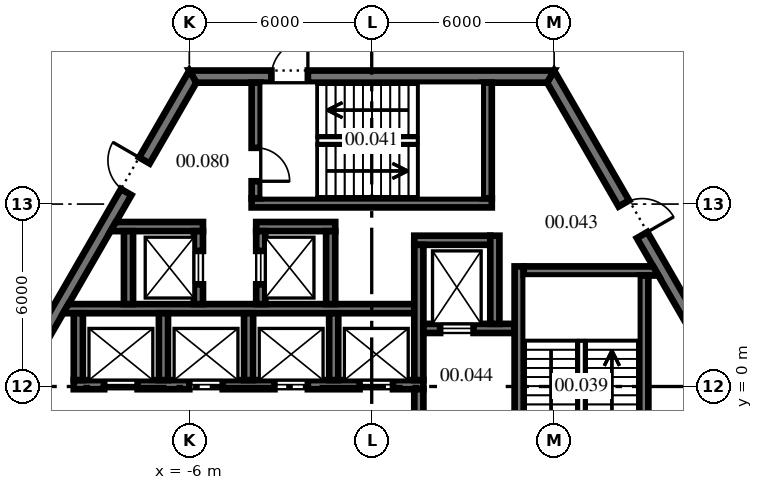
"""IFC4 building model, lengths in metres.
Left out: names, types, materials, properties, quantities, classifications, styles, units other than length and angle.
Written with IfcOpenShell. Run it as: python <this file> out.ifc"""

import sys

from ifc_helpers import new_model, si_unit, direction, frame, frame_2d, origin, place, context, subcontext, project, spatial, polyline, rectangle, outline, extrude, source, transform, mapped, element, fill, save


model = new_model("IFC4")
c1 = context("Model", 3, precision=1e-05, world=origin(), true_north=direction((0.0, 1.0)))
c2 = subcontext(c1, "Body", "Model", "MODEL_VIEW")
j1 = project(units=[si_unit("LENGTHUNIT", "METRE"), si_unit("PLANEANGLEUNIT", "RADIAN")], contexts=[c1])
p1 = place(None, origin())
s1 = spatial("IfcSite", under=j1, at=p1, CompositionType="ELEMENT")
p2 = place(p1, origin())
s2 = spatial("IfcBuilding", under=s1, at=p2, CompositionType="ELEMENT")
p3 = place(p2, origin())
s3 = spatial("IfcBuildingStorey", under=s2, at=p3, CompositionType="ELEMENT", Elevation=0.0)
m1 = source(origin(), c2, "Body", "SweptSolid", [
    extrude(outline(polyline([(-0.115, -0.2), (11.885, -0.2), (11.654, 0.2), (0.115, 0.2), (-0.115, -0.2)])), origin(), (0.0, 0.0, 1.0), 7.0),
])
p4 = place(p3, frame((11.769, 0.0, -0.2), z_axis=(0.0, 0.0, 1.0), x_axis=(-0.499996592174, 0.866027371285, 0.0)))
e1 = element("IfcWall", 1, at=p4, inside=s3, PredefinedType="SHEAR", context=c2, shape_type="MappedRepresentation", body=[
    mapped(m1, transform((0.0, 0.0, 0.0), scale=1.0)),
])
p5 = place(p4, frame((5.75, 0.0, 0.2)))
e2 = element("IfcOpeningElement", 2, at=p5, cuts=e1, PredefinedType="OPENING", context=c2, shape_type="SweptSolid", body=[
    extrude(rectangle(XDim=1.2, YDim=2.1, at=frame_2d((0.6, 1.05))), frame((0.0, 0.21, 0.0), z_axis=(0.0, -1.0, 0.0), x_axis=(1.0, 0.0, 0.0)), (0.0, 0.0, 1.0), 0.42),
])
p6 = place(p3, frame((5.885, 10.192, -0.2), z_axis=(0.0, 0.0, 1.0), x_axis=(-1.0, 0.0, 0.0)))
e3 = element("IfcWall", 3, at=p6, inside=s3, PredefinedType="SHEAR", context=c2, shape_type="MappedRepresentation", body=[
    mapped(m1, transform((0.0, 0.0, 0.0), scale=1.0)),
])
p7 = place(p6, frame((7.985, 0.0, 0.2)))
e4 = element("IfcOpeningElement", 4, at=p7, cuts=e3, PredefinedType="OPENING", context=c2, shape_type="SweptSolid", body=[
    extrude(rectangle(XDim=1.2, YDim=2.1, at=frame_2d((0.6, 1.05))), frame((0.0, 0.21, 0.0), z_axis=(0.0, -1.0, 0.0), x_axis=(1.0, 0.0, 0.0)), (0.0, 0.0, 1.0), 0.42),
])
p8 = place(p3, frame((-5.885, 10.192, -0.2), z_axis=(0.0, 0.0, 1.0), x_axis=(-0.499996592174, -0.866027371285, 0.0)))
e5 = element("IfcWall", 5, at=p8, inside=s3, PredefinedType="SHEAR", context=c2, shape_type="MappedRepresentation", body=[
    mapped(m1, transform((0.0, 0.0, 0.0), scale=1.0)),
])
p9 = place(p8, frame((3.185, 0.0, 0.2)))
e6 = element("IfcOpeningElement", 6, at=p9, cuts=e5, PredefinedType="OPENING", context=c2, shape_type="SweptSolid", body=[
    extrude(rectangle(XDim=1.2, YDim=2.1, at=frame_2d((0.6, 1.05))), frame((0.0, 0.21, 0.0), z_axis=(0.0, -1.0, 0.0), x_axis=(1.0, 0.0, 0.0)), (0.0, 0.0, 1.0), 0.42),
])
p10 = place(p3, frame((-11.769, 0.0, -0.2), z_axis=(0.0, 0.0, 1.0), x_axis=(0.499996592174, -0.866027371285, 0.0)))
e7 = element("IfcWall", 7, at=p10, inside=s3, PredefinedType="SHEAR", context=c2, shape_type="MappedRepresentation", body=[
    mapped(m1, transform((0.0, 0.0, 0.0), scale=1.0)),
])
p11 = place(p10, frame((1.405, 0.0, 0.2)))
e8 = element("IfcOpeningElement", 8, at=p11, cuts=e7, PredefinedType="OPENING", context=c2, shape_type="SweptSolid", body=[
    extrude(rectangle(XDim=1.8, YDim=2.1, at=frame_2d((0.9, 1.05))), frame((0.0, 0.21, 0.0), z_axis=(0.0, -1.0, 0.0), x_axis=(1.0, 0.0, 0.0)), (0.0, 0.0, 1.0), 0.42),
])
p12 = place(p10, frame((7.915, 0.0, 0.2)))
e9 = element("IfcOpeningElement", 9, at=p12, cuts=e7, PredefinedType="OPENING", context=c2, shape_type="SweptSolid", body=[
    extrude(rectangle(XDim=1.2, YDim=2.1, at=frame_2d((0.6, 1.05))), frame((0.0, 0.21, 0.0), z_axis=(0.0, -1.0, 0.0), x_axis=(1.0, 0.0, 0.0)), (0.0, 0.0, 1.0), 0.42),
])
p13 = place(p3, frame((5.885, -10.192, -0.2), z_axis=(0.0, 0.0, 1.0), x_axis=(0.499996592174, 0.866027371285, 0.0)))
e10 = element("IfcWall", 10, at=p13, inside=s3, PredefinedType="SHEAR", context=c2, shape_type="MappedRepresentation", body=[
    mapped(m1, transform((0.0, 0.0, 0.0), scale=1.0)),
])
p14 = place(p13, frame((3.665, 0.0, 0.2)))
e11 = element("IfcOpeningElement", 11, at=p14, cuts=e10, PredefinedType="OPENING", context=c2, shape_type="SweptSolid", body=[
    extrude(rectangle(XDim=1.2, YDim=2.1, at=frame_2d((0.6, 1.05))), frame((0.0, 0.21, 0.0), z_axis=(0.0, -1.0, 0.0), x_axis=(1.0, 0.0, 0.0)), (0.0, 0.0, 1.0), 0.42),
])
p15 = place(p3, frame((-9.8, 0.06, -0.2), z_axis=(0.0, 0.0, 1.0), x_axis=(1.0, 0.0, 0.0)))
e12 = element("IfcWall", 12, at=p15, inside=s3, PredefinedType="SHEAR", context=c2, shape_type="SweptSolid", body=[
    extrude(rectangle(XDim=11.5, YDim=0.3, at=frame_2d((5.75, 0.0))), origin(), (0.0, 0.0, 1.0), 7.0),
])
p16 = place(p15, frame((1.0, 0.0, 0.2)))
e13 = element("IfcOpeningElement", 13, at=p16, cuts=e12, PredefinedType="OPENING", context=c2, shape_type="SweptSolid", body=[
    extrude(rectangle(XDim=1.1, YDim=2.1, at=frame_2d((0.55, 1.05))), frame((0.0, 0.16, 0.0), z_axis=(0.0, -1.0, 0.0), x_axis=(1.0, 0.0, 0.0)), (0.0, 0.0, 1.0), 0.32),
])
p17 = place(p15, frame((3.8, 0.0, 0.2)))
e14 = element("IfcOpeningElement", 14, at=p17, cuts=e12, PredefinedType="OPENING", context=c2, shape_type="SweptSolid", body=[
    extrude(rectangle(XDim=1.1, YDim=2.1, at=frame_2d((0.55, 1.05))), frame((0.0, 0.16, 0.0), z_axis=(0.0, -1.0, 0.0), x_axis=(1.0, 0.0, 0.0)), (0.0, 0.0, 1.0), 0.32),
])
p18 = place(p15, frame((6.6, 0.0, 0.2)))
e15 = element("IfcOpeningElement", 15, at=p18, cuts=e12, PredefinedType="OPENING", context=c2, shape_type="SweptSolid", body=[
    extrude(rectangle(XDim=1.1, YDim=2.1, at=frame_2d((0.55, 1.05))), frame((0.0, 0.16, 0.0), z_axis=(0.0, -1.0, 0.0), x_axis=(1.0, 0.0, 0.0)), (0.0, 0.0, 1.0), 0.32),
])
p19 = place(p15, frame((9.4, 0.0, 0.2)))
e16 = element("IfcOpeningElement", 16, at=p19, cuts=e12, PredefinedType="OPENING", context=c2, shape_type="SweptSolid", body=[
    extrude(rectangle(XDim=1.1, YDim=2.1, at=frame_2d((0.55, 1.05))), frame((0.0, 0.16, 0.0), z_axis=(0.0, -1.0, 0.0), x_axis=(1.0, 0.0, 0.0)), (0.0, 0.0, 1.0), 0.32),
])
p20 = place(p3, frame((-9.8, 2.56, -0.2), z_axis=(0.0, 0.0, 1.0), x_axis=(1.0, 0.0, 0.0)))
e17 = element("IfcWall", 17, at=p20, inside=s3, PredefinedType="SHEAR", context=c2, shape_type="SweptSolid", body=[
    extrude(outline(polyline([(11.2, -0.15), (-0.349, -0.15), (-0.176, 0.15), (11.2, 0.15), (11.2, -0.15)])), origin(), (0.0, 0.0, 1.0), 7.0),
])
m2 = source(origin(), c2, "Body", "SweptSolid", [
    extrude(rectangle(XDim=2.5, YDim=0.3, at=frame_2d((1.25, 0.0))), origin(), (0.0, 0.0, 1.0), 7.0),
])
p21 = place(p3, frame((1.4, 4.81, -0.2), z_axis=(0.0, 0.0, 1.0), x_axis=(1.0, 0.0, 0.0)))
e18 = element("IfcWall", 18, at=p21, inside=s3, PredefinedType="SHEAR", context=c2, shape_type="MappedRepresentation", body=[
    mapped(m2, transform((0.0, 0.0, 0.0), scale=1.0)),
])
p22 = place(p3, frame((1.55, 0.21, -0.2), z_axis=(0.0, 0.0, 1.0), x_axis=(0.0, 1.0, 0.0)))
e19 = element("IfcWall", 19, at=p22, inside=s3, PredefinedType="SHEAR", context=c2, shape_type="SweptSolid", body=[
    extrude(rectangle(XDim=4.45, YDim=0.3, at=frame_2d((2.225, 0.0))), origin(), (0.0, 0.0, 1.0), 7.0),
])
m3 = source(origin(), c2, "Body", "SweptSolid", [
    extrude(rectangle(XDim=3.0, YDim=0.3, at=frame_2d((1.5, 0.0))), origin(), (0.0, 0.0, 1.0), 7.0),
])
p23 = place(p3, frame((1.7, 1.91, -0.2), z_axis=(0.0, 0.0, 1.0), x_axis=(1.0, 0.0, 0.0)))
e20 = element("IfcWall", 20, at=p23, inside=s3, PredefinedType="SHEAR", context=c2, shape_type="MappedRepresentation", body=[
    mapped(m3, transform((0.0, 0.0, 0.0), scale=1.0)),
])
p24 = place(p23, frame((0.55, 0.0, 0.2)))
e21 = element("IfcOpeningElement", 21, at=p24, cuts=e20, PredefinedType="OPENING", context=c2, shape_type="SweptSolid", body=[
    extrude(rectangle(XDim=1.1, YDim=2.1, at=frame_2d((0.55, 1.05))), frame((0.0, 0.16, 0.0), z_axis=(0.0, -1.0, 0.0), x_axis=(1.0, 0.0, 0.0)), (0.0, 0.0, 1.0), 0.32),
])
p25 = place(p3, frame((4.05, 2.06, -0.2), z_axis=(0.0, 0.0, 1.0), x_axis=(0.0, 1.0, 0.0)))
e22 = element("IfcWall", 22, at=p25, inside=s3, PredefinedType="SHEAR", context=c2, shape_type="SweptSolid", body=[
    extrude(rectangle(XDim=2.9, YDim=0.3, at=frame_2d((1.45, 0.0))), origin(), (0.0, 0.0, 1.0), 7.0),
])
m4 = source(origin(), c2, "Body", "SweptSolid", [
    extrude(rectangle(XDim=2.2, YDim=0.3, at=frame_2d((1.1, 0.0))), origin(), (0.0, 0.0, 1.0), 7.0),
])
p26 = place(p3, frame((-9.65, 0.21, -0.2), z_axis=(0.0, 0.0, 1.0), x_axis=(0.0, 1.0, 0.0)))
e23 = element("IfcWall", 23, at=p26, inside=s3, PredefinedType="SHEAR", context=c2, shape_type="MappedRepresentation", body=[
    mapped(m4, transform((0.0, 0.0, 0.0), scale=1.0)),
])
p27 = place(p3, frame((1.55, -3.09, -0.2), z_axis=(0.0, 0.0, 1.0), x_axis=(0.0, 1.0, 0.0)))
e24 = element("IfcWall", 24, at=p27, inside=s3, PredefinedType="SHEAR", context=c2, shape_type="MappedRepresentation", body=[
    mapped(m3, transform((0.0, 0.0, 0.0), scale=1.0)),
])
p28 = place(p27, frame((0.9, 0.0, 0.2)))
e25 = element("IfcOpeningElement", 25, at=p28, cuts=e24, PredefinedType="OPENING", context=c2, shape_type="SweptSolid", body=[
    extrude(rectangle(XDim=1.2, YDim=2.1, at=frame_2d((0.6, 1.05))), frame((0.0, 0.16, 0.0), z_axis=(0.0, -1.0, 0.0), x_axis=(1.0, 0.0, 0.0)), (0.0, 0.0, 1.0), 0.32),
])
p29 = place(p3, frame((4.85, -6.04, -0.2), z_axis=(0.0, 0.0, 1.0), x_axis=(0.0, 1.0, 0.0)))
e26 = element("IfcWall", 26, at=p29, inside=s3, PredefinedType="SHEAR", context=c2, shape_type="SweptSolid", body=[
    extrude(outline(polyline([(-0.15, -0.15), (9.99, -0.15), (9.99, 0.15), (0.15, 0.15), (-0.15, -0.15)])), origin(), (0.0, 0.0, 1.0), 7.0),
])
p30 = place(p29, frame((3.19, 0.0, 0.2)))
e27 = element("IfcOpeningElement", 27, at=p30, cuts=e26, PredefinedType="OPENING", context=c2, shape_type="SweptSolid", body=[
    extrude(rectangle(XDim=1.1, YDim=2.1, at=frame_2d((0.55, 1.05))), frame((0.0, 0.16, 0.0), z_axis=(0.0, -1.0, 0.0), x_axis=(1.0, 0.0, 0.0)), (0.0, 0.0, 1.0), 0.32),
])
p31 = place(p3, frame((5.0, 3.8, -0.2), z_axis=(0.0, 0.0, 1.0), x_axis=(1.0, 0.0, 0.0)))
e28 = element("IfcWall", 28, at=p31, inside=s3, PredefinedType="SHEAR", context=c2, shape_type="SweptSolid", body=[
    extrude(outline(polyline([(0.0, -0.15), (0.0, 0.15), (4.26, 0.15), (4.433, -0.15), (0.0, -0.15)])), origin(), (0.0, 0.0, 1.0), 7.0),
])
p32 = place(p3, frame((8.95, -3.65, -0.2), z_axis=(0.0, 0.0, 1.0), x_axis=(0.0, 1.0, 0.0)))
e29 = element("IfcWall", 29, at=p32, inside=s3, PredefinedType="SHEAR", context=c2, shape_type="SweptSolid", body=[
    extrude(rectangle(XDim=7.3, YDim=0.3, at=frame_2d((3.65, 0.0))), origin(), (0.0, 0.0, 1.0), 7.0),
])
p33 = place(p3, frame((-3.95, 6.04, -0.2), z_axis=(0.0, 0.0, 1.0), x_axis=(1.0, 0.0, 0.0)))
e30 = element("IfcWall", 30, at=p33, inside=s3, PredefinedType="SHEAR", context=c2, shape_type="SweptSolid", body=[
    extrude(rectangle(XDim=7.9, YDim=0.3, at=frame_2d((3.95, 0.0))), origin(), (0.0, 0.0, 1.0), 7.0),
])
m5 = source(origin(), c2, "Body", "SweptSolid", [
    extrude(outline(polyline([(0.0, -0.15), (0.0, 0.15), (3.804, 0.15), (3.804, -0.15), (0.0, -0.15)])), origin(), (0.0, 0.0, 1.0), 7.0),
])
p34 = place(p3, frame((-3.8, 6.19, -0.2), z_axis=(0.0, 0.0, 1.0), x_axis=(0.0, 1.0, 0.0)))
e31 = element("IfcWall", 31, at=p34, inside=s3, PredefinedType="SHEAR", context=c2, shape_type="MappedRepresentation", body=[
    mapped(m5, transform((0.0, 0.0, 0.0), scale=1.0)),
])
p35 = place(p34, frame((0.56, 0.0, 0.2)))
e32 = element("IfcOpeningElement", 32, at=p35, cuts=e31, PredefinedType="OPENING", context=c2, shape_type="SweptSolid", body=[
    extrude(rectangle(XDim=1.1, YDim=2.1, at=frame_2d((0.55, 1.05))), frame((0.0, 0.16, 0.0), z_axis=(0.0, -1.0, 0.0), x_axis=(1.0, 0.0, 0.0)), (0.0, 0.0, 1.0), 0.32),
])
p36 = place(p3, frame((3.8, 6.19, -0.2), z_axis=(0.0, 0.0, 1.0), x_axis=(0.0, 1.0, 0.0)))
e33 = element("IfcWall", 33, at=p36, inside=s3, PredefinedType="SHEAR", context=c2, shape_type="MappedRepresentation", body=[
    mapped(m5, transform((0.0, 0.0, 0.0), scale=1.0)),
])
p37 = place(p3, frame((-8.15, 5.26, -0.2), z_axis=(0.0, 0.0, 1.0), x_axis=(1.0, 0.0, 0.0)))
e34 = element("IfcWall", 34, at=p37, inside=s3, PredefinedType="SHEAR", context=c2, shape_type="SweptSolid", body=[
    extrude(outline(polyline([(2.6, -0.15), (-0.44, -0.15), (-0.267, 0.15), (2.6, 0.15), (2.6, -0.15)])), origin(), (0.0, 0.0, 1.0), 7.0),
])
m6 = source(origin(), c2, "Body", "SweptSolid", [
    extrude(rectangle(XDim=2.4, YDim=0.3, at=frame_2d((1.2, 0.0))), origin(), (0.0, 0.0, 1.0), 7.0),
])
p38 = place(p3, frame((-8.0, 2.71, -0.2), z_axis=(0.0, 0.0, 1.0), x_axis=(0.0, 1.0, 0.0)))
e35 = element("IfcWall", 35, at=p38, inside=s3, PredefinedType="SHEAR", context=c2, shape_type="MappedRepresentation", body=[
    mapped(m6, transform((0.0, 0.0, 0.0), scale=1.0)),
])
p39 = place(p3, frame((-5.7, 2.71, -0.2), z_axis=(0.0, 0.0, 1.0), x_axis=(0.0, 1.0, 0.0)))
e36 = element("IfcWall", 36, at=p39, inside=s3, PredefinedType="SHEAR", context=c2, shape_type="MappedRepresentation", body=[
    mapped(m6, transform((0.0, 0.0, 0.0), scale=1.0)),
])
p40 = place(p39, frame((0.65, 0.0, 0.2)))
e37 = element("IfcOpeningElement", 37, at=p40, cuts=e36, PredefinedType="OPENING", context=c2, shape_type="SweptSolid", body=[
    extrude(rectangle(XDim=1.1, YDim=2.1, at=frame_2d((0.55, 1.05))), frame((0.0, 0.16, 0.0), z_axis=(0.0, -1.0, 0.0), x_axis=(1.0, 0.0, 0.0)), (0.0, 0.0, 1.0), 0.32),
])
p41 = place(p3, frame((-3.8, 5.26, -0.2), z_axis=(0.0, 0.0, 1.0), x_axis=(1.0, 0.0, 0.0)))
e38 = element("IfcWall", 38, at=p41, inside=s3, PredefinedType="SHEAR", context=c2, shape_type="SweptSolid", body=[
    extrude(rectangle(XDim=2.6, YDim=0.3, at=frame_2d((1.3, 0.0))), origin(), (0.0, 0.0, 1.0), 7.0),
])
p42 = place(p3, frame((-3.65, 2.71, -0.2), z_axis=(0.0, 0.0, 1.0), x_axis=(0.0, 1.0, 0.0)))
e39 = element("IfcWall", 39, at=p42, inside=s3, PredefinedType="SHEAR", context=c2, shape_type="MappedRepresentation", body=[
    mapped(m6, transform((0.0, 0.0, 0.0), scale=1.0)),
])
p43 = place(p42, frame((0.65, 0.0, 0.2)))
e40 = element("IfcOpeningElement", 40, at=p43, cuts=e39, PredefinedType="OPENING", context=c2, shape_type="SweptSolid", body=[
    extrude(rectangle(XDim=1.1, YDim=2.1, at=frame_2d((0.55, 1.05))), frame((0.0, 0.16, 0.0), z_axis=(0.0, -1.0, 0.0), x_axis=(1.0, 0.0, 0.0)), (0.0, 0.0, 1.0), 0.32),
])
p44 = place(p3, frame((-1.35, 2.71, -0.2), z_axis=(0.0, 0.0, 1.0), x_axis=(0.0, 1.0, 0.0)))
e41 = element("IfcWall", 41, at=p44, inside=s3, PredefinedType="SHEAR", context=c2, shape_type="MappedRepresentation", body=[
    mapped(m6, transform((0.0, 0.0, 0.0), scale=1.0)),
])
for number, where, z_axis, x_axis in (
    (42, (-6.85, 0.21, -0.2), (0.0, 0.0, 1.0), (0.0, 1.0, 0.0)),
    (43, (-4.05, 0.21, -0.2), (0.0, 0.0, 1.0), (0.0, 1.0, 0.0)),
    (44, (-1.25, 0.21, -0.2), (0.0, 0.0, 1.0), (0.0, 1.0, 0.0)),
):
    element("IfcWall", number, at=place(p3, frame(where, z_axis=z_axis, x_axis=x_axis)), inside=s3, PredefinedType="SHEAR", context=c2, shape_type="MappedRepresentation", body=[
        mapped(m4, transform((0.0, 0.0, 0.0), scale=1.0)),
    ])
p45 = place(p3, frame((-20.66, 0.0, 0.0), z_axis=(0.0, 0.0, 1.0), x_axis=(0.500006476997, 0.866021664256, 0.0)))
e45 = element("IfcWall", 45, at=p45, inside=s3, PredefinedType="PARTITIONING", context=c2, shape_type="SweptSolid", body=[
    extrude(rectangle(XDim=20.66, YDim=0.15, at=frame_2d((10.33, 0.0))), origin(), (0.0, 0.0, 1.0), 6.8),
])
p46 = place(p45, frame((15.51, 0.0, 0.0)))
e46 = element("IfcOpeningElement", 46, at=p46, cuts=e45, PredefinedType="OPENING", context=c2, shape_type="SweptSolid", body=[
    extrude(rectangle(XDim=0.9, YDim=2.1, at=frame_2d((0.45, 1.05))), frame((0.0, 0.085, 0.0), z_axis=(0.0, -1.0, 0.0), x_axis=(1.0, 0.0, 0.0)), (0.0, 0.0, 1.0), 0.17),
])
p47 = place(p45, frame((6.076, 0.0, 0.0)))
e47 = element("IfcOpeningElement", 47, at=p47, cuts=e45, PredefinedType="OPENING", context=c2, shape_type="SweptSolid", body=[
    extrude(rectangle(XDim=0.9, YDim=2.1, at=frame_2d((0.45, 1.05))), frame((0.0, 0.085, 0.0), z_axis=(0.0, -1.0, 0.0), x_axis=(1.0, 0.0, 0.0)), (0.0, 0.0, 1.0), 0.17),
])
p48 = place(p45, frame((0.442, 0.0, 0.0)))
e48 = element("IfcOpeningElement", 48, at=p48, cuts=e45, PredefinedType="OPENING", context=c2, shape_type="SweptSolid", body=[
    extrude(rectangle(XDim=0.9, YDim=2.1, at=frame_2d((0.45, 1.05))), frame((0.0, 0.085, 0.0), z_axis=(0.0, -1.0, 0.0), x_axis=(1.0, 0.0, 0.0)), (0.0, 0.0, 1.0), 0.17),
])
p49 = place(p7, frame((1.2, 0.0, 0.0), z_axis=(0.0, 0.0, 1.0), x_axis=(-1.0, 0.0, 0.0)))
e49 = element("IfcDoor", 49, at=p49, inside=s3, OperationType="SINGLE_SWING_RIGHT", PredefinedType="DOOR", context=c2, shape_type="SweptSolid", body=[
    extrude(rectangle(XDim=1.2, YDim=2.1, at=frame_2d((0.6, 1.05))), frame((0.0, 0.025, 0.0), z_axis=(0.0, -1.0, 0.0), x_axis=(1.0, 0.0, 0.0)), (0.0, 0.0, 1.0), 0.05),
])
fill(e4, e49)
p50 = place(p9, frame((1.2, 0.0, 0.0), z_axis=(0.0, 0.0, 1.0), x_axis=(-1.0, 0.0, 0.0)))
e50 = element("IfcDoor", 50, at=p50, inside=s3, OperationType="SINGLE_SWING_RIGHT", PredefinedType="DOOR", context=c2, shape_type="SweptSolid", body=[
    extrude(rectangle(XDim=1.2, YDim=2.1, at=frame_2d((0.6, 1.05))), frame((0.0, 0.025, 0.0), z_axis=(0.0, -1.0, 0.0), x_axis=(1.0, 0.0, 0.0)), (0.0, 0.0, 1.0), 0.05),
])
fill(e6, e50)
p51 = place(p5, frame((1.2, 0.0, 0.0), z_axis=(0.0, 0.0, 1.0), x_axis=(-1.0, 0.0, 0.0)))
e51 = element("IfcDoor", 51, at=p51, inside=s3, OperationType="SINGLE_SWING_RIGHT", PredefinedType="DOOR", context=c2, shape_type="SweptSolid", body=[
    extrude(rectangle(XDim=1.2, YDim=2.1, at=frame_2d((0.6, 1.05))), frame((0.0, 0.025, 0.0), z_axis=(0.0, -1.0, 0.0), x_axis=(1.0, 0.0, 0.0)), (0.0, 0.0, 1.0), 0.05),
])
fill(e2, e51)
p52 = place(p35, frame((1.1, 0.0, 0.0), z_axis=(0.0, 0.0, 1.0), x_axis=(-1.0, 0.0, 0.0)))
e52 = element("IfcDoor", 52, at=p52, inside=s3, OperationType="SINGLE_SWING_RIGHT", PredefinedType="DOOR", context=c2, shape_type="SweptSolid", body=[
    extrude(rectangle(XDim=1.1, YDim=2.1, at=frame_2d((0.55, 1.05))), frame((0.0, 0.025, 0.0), z_axis=(0.0, -1.0, 0.0), x_axis=(1.0, 0.0, 0.0)), (0.0, 0.0, 1.0), 0.05),
])
fill(e32, e52)
p53 = place(p16, origin())
e53 = element("IfcDoor", 53, at=p53, inside=s3, OperationType="DOUBLE_DOOR_SLIDING", PredefinedType="DOOR", context=c2, shape_type="SweptSolid", body=[
    extrude(rectangle(XDim=1.1, YDim=2.1, at=frame_2d((0.55, 1.05))), frame((0.0, 0.025, 0.0), z_axis=(0.0, -1.0, 0.0), x_axis=(1.0, 0.0, 0.0)), (0.0, 0.0, 1.0), 0.05),
])
fill(e13, e53)
p54 = place(p17, origin())
e54 = element("IfcDoor", 54, at=p54, inside=s3, OperationType="DOUBLE_DOOR_SLIDING", PredefinedType="DOOR", context=c2, shape_type="SweptSolid", body=[
    extrude(rectangle(XDim=1.1, YDim=2.1, at=frame_2d((0.55, 1.05))), frame((0.0, 0.025, 0.0), z_axis=(0.0, -1.0, 0.0), x_axis=(1.0, 0.0, 0.0)), (0.0, 0.0, 1.0), 0.05),
])
fill(e14, e54)
p55 = place(p18, origin())
e55 = element("IfcDoor", 55, at=p55, inside=s3, OperationType="DOUBLE_DOOR_SLIDING", PredefinedType="DOOR", context=c2, shape_type="SweptSolid", body=[
    extrude(rectangle(XDim=1.1, YDim=2.1, at=frame_2d((0.55, 1.05))), frame((0.0, 0.025, 0.0), z_axis=(0.0, -1.0, 0.0), x_axis=(1.0, 0.0, 0.0)), (0.0, 0.0, 1.0), 0.05),
])
fill(e15, e55)
p56 = place(p19, origin())
e56 = element("IfcDoor", 56, at=p56, inside=s3, OperationType="DOUBLE_DOOR_SLIDING", PredefinedType="DOOR", context=c2, shape_type="SweptSolid", body=[
    extrude(rectangle(XDim=1.1, YDim=2.1, at=frame_2d((0.55, 1.05))), frame((0.0, 0.025, 0.0), z_axis=(0.0, -1.0, 0.0), x_axis=(1.0, 0.0, 0.0)), (0.0, 0.0, 1.0), 0.05),
])
fill(e16, e56)
p57 = place(p24, origin())
e57 = element("IfcDoor", 57, at=p57, inside=s3, OperationType="DOUBLE_DOOR_SLIDING", PredefinedType="DOOR", context=c2, shape_type="SweptSolid", body=[
    extrude(rectangle(XDim=1.1, YDim=2.1, at=frame_2d((0.55, 1.05))), frame((0.0, 0.025, 0.0), z_axis=(0.0, -1.0, 0.0), x_axis=(1.0, 0.0, 0.0)), (0.0, 0.0, 1.0), 0.05),
])
fill(e21, e57)
p58 = place(p40, origin())
e58 = element("IfcDoor", 58, at=p58, inside=s3, OperationType="DOUBLE_DOOR_SLIDING", PredefinedType="DOOR", context=c2, shape_type="SweptSolid", body=[
    extrude(rectangle(XDim=1.1, YDim=2.1, at=frame_2d((0.55, 1.05))), frame((0.0, 0.025, 0.0), z_axis=(0.0, -1.0, 0.0), x_axis=(1.0, 0.0, 0.0)), (0.0, 0.0, 1.0), 0.05),
])
fill(e37, e58)
p59 = place(p43, origin())
e59 = element("IfcDoor", 59, at=p59, inside=s3, OperationType="DOUBLE_DOOR_SLIDING", PredefinedType="DOOR", context=c2, shape_type="SweptSolid", body=[
    extrude(rectangle(XDim=1.1, YDim=2.1, at=frame_2d((0.55, 1.05))), frame((0.0, 0.025, 0.0), z_axis=(0.0, -1.0, 0.0), x_axis=(1.0, 0.0, 0.0)), (0.0, 0.0, 1.0), 0.05),
])
fill(e40, e59)
save(model, sys.argv[1])
